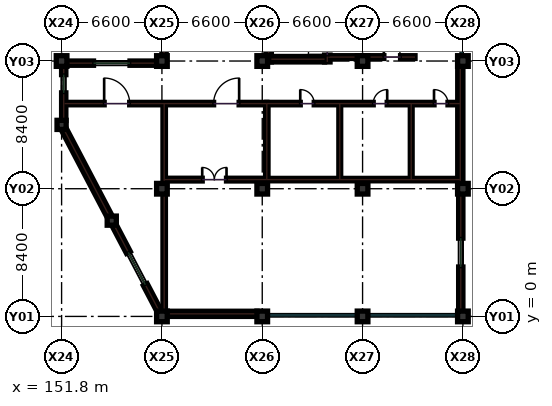
"""IFC4 building model, lengths in metres.
Left out: names, types, materials, properties, quantities, classifications, styles, units other than length and angle.
Written with IfcOpenShell. Run it as: python <this file> out.ifc"""

import sys

from ifc_helpers import new_model, si_unit, direction, frame, frame_2d, origin, origin_2d, place, context, subcontext, project, spatial, rectangle, extrude, element, fill, save


model = new_model("IFC4")
c1 = context("Model", 3, precision=1e-05, world=origin(), true_north=direction((0.0, 1.0)))
c2 = subcontext(c1, "Body", "Model", "MODEL_VIEW")
j1 = project(units=[si_unit("LENGTHUNIT", "METRE"), si_unit("PLANEANGLEUNIT", "RADIAN")], contexts=[c1])
p1 = place(None, origin())
s1 = spatial("IfcSite", under=j1, at=p1, CompositionType="ELEMENT")
p2 = place(p1, origin())
s2 = spatial("IfcBuilding", under=s1, at=p2, CompositionType="ELEMENT")
p3 = place(p2, frame((0.0, 0.0, 14.4)))
s3 = spatial("IfcBuildingStorey", under=s2, at=p3, CompositionType="ELEMENT", Elevation=14.4)
for number, where, z_axis, x_axis in (
    (1, (151.8, 16.8, 0.0), (0.0, 0.0, 1.0), (1.0, 0.0, 0.0)),
    (2, (158.4, 0.0, 0.0), (0.0, 0.0, 1.0), (1.0, 0.0, 0.0)),
    (3, (158.4, 8.4, 0.0), (0.0, 0.0, 1.0), (1.0, 0.0, 0.0)),
    (4, (158.4, 16.8, 0.0), (0.0, 0.0, 1.0), (1.0, 0.0, 0.0)),
    (5, (165.0, 0.0, 0.0), (0.0, 0.0, 1.0), (1.0, 0.0, 0.0)),
    (6, (165.0, 8.4, 0.0), (0.0, 0.0, 1.0), (1.0, 0.0, 0.0)),
    (7, (165.0, 16.8, 0.0), (0.0, 0.0, 1.0), (1.0, 0.0, 0.0)),
    (8, (171.6, 0.0, 0.0), (0.0, 0.0, 1.0), (1.0, 0.0, 0.0)),
    (9, (171.6, 8.4, 0.0), (0.0, 0.0, 1.0), (1.0, 0.0, 0.0)),
    (10, (171.6, 16.8, 0.0), (0.0, 0.0, 1.0), (1.0, 0.0, 0.0)),
    (11, (178.2, 0.0, 0.0), (0.0, 0.0, 1.0), (1.0, 0.0, 0.0)),
    (12, (178.2, 8.4, 0.0), (0.0, 0.0, 1.0), (1.0, 0.0, 0.0)),
    (13, (178.2, 16.8, 0.0), (0.0, 0.0, 1.0), (1.0, 0.0, 0.0)),
):
    element("IfcColumn", number, at=place(p3, frame(where, z_axis=z_axis, x_axis=x_axis)), inside=s3, PredefinedType="COLUMN", context=c2, shape_type="SweptSolid", body=[
        extrude(rectangle(XDim=0.7, YDim=0.7, at=origin_2d()), origin(), (0.0, 0.0, 1.0), 4.2),
    ])
for number, where, z_axis, x_axis in (
    (14, (151.8, 12.6, 0.0), (0.0, 0.0, 1.0), (1.0, 0.0, 0.0)),
    (15, (155.1, 6.3, 0.0), (0.0, 0.0, 1.0), (1.0, 0.0, 0.0)),
):
    element("IfcColumn", number, at=place(p3, frame(where, z_axis=z_axis, x_axis=x_axis)), inside=s3, PredefinedType="COLUMN", context=c2, shape_type="SweptSolid", body=[
        extrude(rectangle(XDim=0.6, YDim=0.6, at=origin_2d()), origin(), (0.0, 0.0, 1.0), 4.2),
    ])
p4 = place(p3, frame((165.3, 14.0, 0.0), z_axis=(0.0, 0.0, 1.0), x_axis=(1.0, 0.0, 0.0)))
e16 = element("IfcWall", 16, at=p4, inside=s3, PredefinedType="PARTITIONING", context=c2, shape_type="SweptSolid", body=[
    extrude(rectangle(XDim=12.7, YDim=0.16, at=frame_2d((6.35, 0.0))), origin(), (0.0, 0.0, 1.0), 3.19),
])
p5 = place(p4, frame((2.2, 0.0, 0.0)))
e17 = element("IfcOpeningElement", 17, at=p5, cuts=e16, PredefinedType="OPENING", context=c2, shape_type="SweptSolid", body=[
    extrude(rectangle(XDim=0.92, YDim=2.08, at=frame_2d((0.46, 1.04))), frame((0.0, 0.09, 0.0), z_axis=(0.0, -1.0, 0.0), x_axis=(1.0, 0.0, 0.0)), (0.0, 0.0, 1.0), 0.18),
])
p6 = place(p4, frame((7.0, 0.0, 0.0)))
e18 = element("IfcOpeningElement", 18, at=p6, cuts=e16, PredefinedType="OPENING", context=c2, shape_type="SweptSolid", body=[
    extrude(rectangle(XDim=0.92, YDim=2.08, at=frame_2d((0.46, 1.04))), frame((0.0, 0.09, 0.0), z_axis=(0.0, -1.0, 0.0), x_axis=(1.0, 0.0, 0.0)), (0.0, 0.0, 1.0), 0.18),
])
p7 = place(p4, frame((11.0, 0.0, 0.0)))
e19 = element("IfcOpeningElement", 19, at=p7, cuts=e16, PredefinedType="OPENING", context=c2, shape_type="SweptSolid", body=[
    extrude(rectangle(XDim=0.92, YDim=2.08, at=frame_2d((0.46, 1.04))), frame((0.0, 0.09, 0.0), z_axis=(0.0, -1.0, 0.0), x_axis=(1.0, 0.0, 0.0)), (0.0, 0.0, 1.0), 0.18),
])
p8 = place(p3, frame((165.3, 9.0, 0.0), z_axis=(0.0, 0.0, 1.0), x_axis=(1.0, 0.0, 0.0)))
e20 = element("IfcWall", 20, at=p8, inside=s3, PredefinedType="PARTITIONING", context=c2, shape_type="SweptSolid", body=[
    extrude(rectangle(XDim=12.7, YDim=0.16, at=frame_2d((6.35, 0.0))), origin(), (0.0, 0.0, 1.0), 3.19),
])
p9 = place(p3, frame((165.3, 9.0, 0.0), z_axis=(0.0, 0.0, 1.0), x_axis=(0.0, 1.0, 0.0)))
e21 = element("IfcWall", 21, at=p9, inside=s3, PredefinedType="PARTITIONING", context=c2, shape_type="SweptSolid", body=[
    extrude(rectangle(XDim=5.0, YDim=0.16, at=frame_2d((2.5, 0.0))), origin(), (0.0, 0.0, 1.0), 3.19),
])
for number, where, z_axis, x_axis in (
    (22, (170.1, 9.0, 0.0), (0.0, 0.0, 1.0), (0.0, 1.0, 0.0)),
    (23, (174.8, 9.0, 0.0), (0.0, 0.0, 1.0), (0.0, 1.0, 0.0)),
):
    element("IfcWall", number, at=place(p3, frame(where, z_axis=z_axis, x_axis=x_axis)), inside=s3, PredefinedType="PARTITIONING", context=c2, shape_type="SweptSolid", body=[
        extrude(rectangle(XDim=5.0, YDim=0.12, at=frame_2d((2.5, 0.0))), origin(), (0.0, 0.0, 1.0), 3.19),
    ])
p10 = place(p3, frame((158.55, 9.0, 0.0), z_axis=(0.0, 0.0, 1.0), x_axis=(1.0, 0.0, 0.0)))
e24 = element("IfcWall", 24, at=p10, inside=s3, PredefinedType="SOLIDWALL", context=c2, shape_type="SweptSolid", body=[
    extrude(rectangle(XDim=6.75, YDim=0.18, at=frame_2d((3.375, 0.0))), origin(), (0.0, 0.0, 1.0), 3.19),
])
p11 = place(p10, frame((2.5, 0.0, 0.0)))
e25 = element("IfcOpeningElement", 25, at=p11, cuts=e24, PredefinedType="OPENING", context=c2, shape_type="SweptSolid", body=[
    extrude(rectangle(XDim=1.6, YDim=2.2, at=frame_2d((0.8, 1.1))), frame((0.0, 0.1, 0.0), z_axis=(0.0, -1.0, 0.0), x_axis=(1.0, 0.0, 0.0)), (0.0, 0.0, 1.0), 0.2),
])
p12 = place(p3, frame((158.55, 0.25, 0.0), z_axis=(0.0, 0.0, 1.0), x_axis=(0.0, 1.0, 0.0)))
e26 = element("IfcWall", 26, at=p12, inside=s3, PredefinedType="PARTITIONING", context=c2, shape_type="SweptSolid", body=[
    extrude(rectangle(XDim=7.7, YDim=0.16, at=frame_2d((3.85, 0.0))), origin(), (0.0, 0.0, 1.0), 3.19),
])
p13 = place(p3, frame((158.55, 8.85, 0.0), z_axis=(0.0, 0.0, 1.0), x_axis=(0.0, 1.0, 0.0)))
e27 = element("IfcWall", 27, at=p13, inside=s3, PredefinedType="PARTITIONING", context=c2, shape_type="SweptSolid", body=[
    extrude(rectangle(XDim=5.15, YDim=0.16, at=frame_2d((2.575, 0.0))), origin(), (0.0, 0.0, 1.0), 3.19),
])
p14 = place(p3, frame((152.0, 14.0, 0.0), z_axis=(0.0, 0.0, 1.0), x_axis=(1.0, 0.0, 0.0)))
e28 = element("IfcWall", 28, at=p14, inside=s3, PredefinedType="PARTITIONING", context=c2, shape_type="SweptSolid", body=[
    extrude(rectangle(XDim=13.3, YDim=0.16, at=frame_2d((6.65, 0.0))), origin(), (0.0, 0.0, 1.0), 3.19),
])
p15 = place(p14, frame((2.6, 0.0, 0.0)))
e29 = element("IfcOpeningElement", 29, at=p15, cuts=e28, PredefinedType="OPENING", context=c2, shape_type="SweptSolid", body=[
    extrude(rectangle(XDim=1.68, YDim=2.28, at=frame_2d((0.84, 1.14))), frame((0.0, 0.09, 0.0), z_axis=(0.0, -1.0, 0.0), x_axis=(1.0, 0.0, 0.0)), (0.0, 0.0, 1.0), 0.18),
])
p16 = place(p14, frame((9.8, 0.0, 0.0)))
e30 = element("IfcOpeningElement", 30, at=p16, cuts=e28, PredefinedType="OPENING", context=c2, shape_type="SweptSolid", body=[
    extrude(rectangle(XDim=1.68, YDim=2.28, at=frame_2d((0.84, 1.14))), frame((0.0, 0.09, 0.0), z_axis=(0.0, -1.0, 0.0), x_axis=(1.0, 0.0, 0.0)), (0.0, 0.0, 1.0), 0.18),
])
p17 = place(p3, frame((158.055, 16.66, 0.0), z_axis=(0.0, 0.0, 1.0), x_axis=(-1.0, 0.0, 0.0)))
e31 = element("IfcWall", 31, at=p17, inside=s3, PredefinedType="SOLIDWALL", context=c2, shape_type="SweptSolid", body=[
    extrude(rectangle(XDim=5.91, YDim=0.28, at=frame_2d((2.955, 0.0))), origin(), (0.0, 0.0, 1.0), 3.325),
])
p18 = place(p17, frame((1.755, 0.0, 0.95)))
e32 = element("IfcOpeningElement", 32, at=p18, cuts=e31, PredefinedType="OPENING", context=c2, shape_type="SweptSolid", body=[
    extrude(rectangle(XDim=2.4, YDim=1.6, at=frame_2d((1.2, 0.8))), frame((0.0, 0.15, 0.0), z_axis=(0.0, -1.0, 0.0), x_axis=(1.0, 0.0, 0.0)), (0.0, 0.0, 1.0), 0.3),
])
p19 = place(p3, frame((158.745, 0.17, 0.0), z_axis=(0.0, 0.0, 1.0), x_axis=(1.0, 0.0, 0.0)))
e33 = element("IfcWall", 33, at=p19, inside=s3, PredefinedType="SHEAR", context=c2, shape_type="SweptSolid", body=[
    extrude(rectangle(XDim=5.91, YDim=0.34, at=frame_2d((2.955, 0.0))), origin(), (0.0, 0.0, 1.0), 3.94),
])
p20 = place(p3, frame((158.54, 24.855, 0.0), z_axis=(0.0, 0.0, 1.0), x_axis=(0.0, -1.0, 0.0)))
e34 = element("IfcWall", 34, at=p20, inside=s3, PredefinedType="SOLIDWALL", context=c2, shape_type="SweptSolid", body=[
    extrude(rectangle(XDim=7.71, YDim=0.28, at=frame_2d((3.855, 0.0))), origin(), (0.0, 0.0, 1.0), 3.225),
])
p21 = place(p20, frame((2.555, 0.0, 0.95)))
e35 = element("IfcOpeningElement", 35, at=p21, cuts=e34, PredefinedType="OPENING", context=c2, shape_type="SweptSolid", body=[
    extrude(rectangle(XDim=2.6, YDim=1.9, at=frame_2d((1.3, 0.95))), frame((0.0, 0.15, 0.0), z_axis=(0.0, -1.0, 0.0), x_axis=(1.0, 0.0, 0.0)), (0.0, 0.0, 1.0), 0.3),
])
p22 = place(p3, frame((178.06, 0.345, 0.0), z_axis=(0.0, 0.0, 1.0), x_axis=(0.0, 1.0, 0.0)))
e36 = element("IfcWall", 36, at=p22, inside=s3, PredefinedType="SOLIDWALL", context=c2, shape_type="SweptSolid", body=[
    extrude(rectangle(XDim=7.71, YDim=0.28, at=frame_2d((3.855, 0.0))), origin(), (0.0, 0.0, 1.0), 3.225),
])
p23 = place(p22, frame((2.905, 0.0, 0.95)))
e37 = element("IfcOpeningElement", 37, at=p23, cuts=e36, PredefinedType="OPENING", context=c2, shape_type="SweptSolid", body=[
    extrude(rectangle(XDim=1.9, YDim=1.85, at=frame_2d((0.95, 0.925))), frame((0.0, 0.15, 0.0), z_axis=(0.0, -1.0, 0.0), x_axis=(1.0, 0.0, 0.0)), (0.0, 0.0, 1.0), 0.3),
])
p24 = place(p3, frame((178.03, 8.745, 0.0), z_axis=(0.0, 0.0, 1.0), x_axis=(0.0, 1.0, 0.0)))
e38 = element("IfcWall", 38, at=p24, inside=s3, PredefinedType="SHEAR", context=c2, shape_type="SweptSolid", body=[
    extrude(rectangle(XDim=7.71, YDim=0.34, at=frame_2d((3.855, 0.0))), origin(), (0.0, 0.0, 1.0), 3.94),
])
p25 = place(p3, frame((151.94, 16.455, 0.0), z_axis=(0.0, 0.0, 1.0), x_axis=(0.0, -1.0, 0.0)))
e39 = element("IfcWall", 39, at=p25, inside=s3, PredefinedType="SOLIDWALL", context=c2, shape_type="SweptSolid", body=[
    extrude(rectangle(XDim=3.56, YDim=0.28, at=frame_2d((1.78, 0.0))), origin(), (0.0, 0.0, 1.0), 3.325),
])
p26 = place(p25, frame((0.55, 0.0, 0.95)))
e40 = element("IfcOpeningElement", 40, at=p26, cuts=e39, PredefinedType="OPENING", context=c2, shape_type="SweptSolid", body=[
    extrude(rectangle(XDim=1.2, YDim=1.5, at=frame_2d((0.6, 0.75))), frame((0.0, 0.15, 0.0), z_axis=(0.0, -1.0, 0.0), x_axis=(1.0, 0.0, 0.0)), (0.0, 0.0, 1.0), 0.3),
])
p27 = place(p3, frame((151.95, 12.31, 0.0), z_axis=(0.0, 0.0, 1.0), x_axis=(0.464471613901, -0.885588007981, 0.0)))
e41 = element("IfcWall", 41, at=p27, inside=s3, PredefinedType="SHEAR", context=c2, shape_type="SweptSolid", body=[
    extrude(rectangle(XDim=6.459, YDim=0.34, at=frame_2d((3.229, 0.0))), origin(), (0.0, 0.0, 1.0), 3.94),
])
p28 = place(p3, frame((155.25, 6.01, 0.0), z_axis=(0.0, 0.0, 1.0), x_axis=(0.464471613901, -0.885588007981, 0.0)))
e42 = element("IfcWall", 42, at=p28, inside=s3, PredefinedType="SOLIDWALL", context=c2, shape_type="SweptSolid", body=[
    extrude(rectangle(XDim=6.459, YDim=0.28, at=frame_2d((3.229, 0.0))), origin(), (0.0, 0.0, 1.0), 3.325),
])
p29 = place(p28, frame((2.03, 0.0, 0.95)))
e43 = element("IfcOpeningElement", 43, at=p29, cuts=e42, PredefinedType="OPENING", context=c2, shape_type="SweptSolid", body=[
    extrude(rectangle(XDim=2.4, YDim=1.6, at=frame_2d((1.2, 0.8))), frame((0.0, 0.15, 0.0), z_axis=(0.0, -1.0, 0.0), x_axis=(1.0, 0.0, 0.0)), (0.0, 0.0, 1.0), 0.3),
])
p30 = place(p3, frame((165.42, 16.74, 0.0), z_axis=(0.0, 0.0, 1.0), x_axis=(0.0, 1.0, 0.0)))
e44 = element("IfcWall", 44, at=p30, inside=s3, PredefinedType="SHEAR", context=c2, shape_type="SweptSolid", body=[
    extrude(rectangle(XDim=8.37, YDim=0.36, at=frame_2d((4.185, 0.0))), origin(), (0.0, 0.0, 1.0), 3.94),
])
p31 = place(p3, frame((169.28, 16.74, 0.0), z_axis=(0.0, 0.0, 1.0), x_axis=(0.0, 1.0, 0.0)))
e45 = element("IfcWall", 45, at=p31, inside=s3, PredefinedType="SHEAR", context=c2, shape_type="SweptSolid", body=[
    extrude(rectangle(XDim=8.37, YDim=0.36, at=frame_2d((4.185, 0.0))), origin(), (0.0, 0.0, 1.0), 3.94),
])
p32 = place(p31, frame((0.45, 0.0, 0.0)))
e46 = element("IfcOpeningElement", 46, at=p32, cuts=e45, PredefinedType="OPENING", context=c2, shape_type="SweptSolid", body=[
    extrude(rectangle(XDim=1.25, YDim=2.15, at=frame_2d((0.625, 1.075))), frame((0.0, 0.19, 0.0), z_axis=(0.0, -1.0, 0.0), x_axis=(1.0, 0.0, 0.0)), (0.0, 0.0, 1.0), 0.38),
])
p33 = place(p3, frame((165.6, 16.92, 0.0), z_axis=(0.0, 0.0, 1.0), x_axis=(1.0, 0.0, 0.0)))
e47 = element("IfcWall", 47, at=p33, inside=s3, PredefinedType="SHEAR", context=c2, shape_type="SweptSolid", body=[
    extrude(rectangle(XDim=3.5, YDim=0.36, at=frame_2d((1.75, 0.0))), origin(), (0.0, 0.0, 1.0), 3.94),
])
p34 = place(p3, frame((169.35, 17.06, 0.0), z_axis=(0.0, 0.0, 1.0), x_axis=(1.0, 0.0, 0.0)))
e48 = element("IfcWall", 48, at=p34, inside=s3, PredefinedType="SOLIDWALL", context=c2, shape_type="SweptSolid", body=[
    extrude(rectangle(XDim=5.7, YDim=0.18, at=frame_2d((2.85, 0.0))), origin(), (0.0, 0.0, 1.0), 3.275),
])
p35 = place(p34, frame((3.65, 0.0, 0.0)))
e49 = element("IfcOpeningElement", 49, at=p35, cuts=e48, PredefinedType="OPENING", context=c2, shape_type="SweptSolid", body=[
    extrude(rectangle(XDim=1.1, YDim=2.15, at=frame_2d((0.55, 1.075))), frame((0.0, 0.1, 0.0), z_axis=(0.0, -1.0, 0.0), x_axis=(1.0, 0.0, 0.0)), (0.0, 0.0, 1.0), 0.2),
])
p36 = place(p5, origin())
e50 = element("IfcDoor", 50, at=p36, inside=s3, OperationType="SINGLE_SWING_LEFT", PredefinedType="DOOR", context=c2, shape_type="SweptSolid", body=[
    extrude(rectangle(XDim=0.92, YDim=2.08, at=frame_2d((0.46, 1.04))), frame((0.0, 0.025, 0.0), z_axis=(0.0, -1.0, 0.0), x_axis=(1.0, 0.0, 0.0)), (0.0, 0.0, 1.0), 0.05),
])
fill(e17, e50)
p37 = place(p6, origin())
e51 = element("IfcDoor", 51, at=p37, inside=s3, OperationType="SINGLE_SWING_RIGHT", PredefinedType="DOOR", context=c2, shape_type="SweptSolid", body=[
    extrude(rectangle(XDim=0.92, YDim=2.08, at=frame_2d((0.46, 1.04))), frame((0.0, 0.025, 0.0), z_axis=(0.0, -1.0, 0.0), x_axis=(1.0, 0.0, 0.0)), (0.0, 0.0, 1.0), 0.05),
])
fill(e18, e51)
p38 = place(p7, origin())
e52 = element("IfcDoor", 52, at=p38, inside=s3, OperationType="SINGLE_SWING_LEFT", PredefinedType="DOOR", context=c2, shape_type="SweptSolid", body=[
    extrude(rectangle(XDim=0.92, YDim=2.08, at=frame_2d((0.46, 1.04))), frame((0.0, 0.025, 0.0), z_axis=(0.0, -1.0, 0.0), x_axis=(1.0, 0.0, 0.0)), (0.0, 0.0, 1.0), 0.05),
])
fill(e19, e52)
p39 = place(p11, origin())
e53 = element("IfcDoor", 53, at=p39, inside=s3, OperationType="DOUBLE_DOOR_SINGLE_SWING", PredefinedType="DOOR", context=c2, shape_type="SweptSolid", body=[
    extrude(rectangle(XDim=1.6, YDim=2.2, at=frame_2d((0.8, 1.1))), frame((0.0, 0.025, 0.0), z_axis=(0.0, -1.0, 0.0), x_axis=(1.0, 0.0, 0.0)), (0.0, 0.0, 1.0), 0.05),
])
fill(e25, e53)
p40 = place(p15, origin())
e54 = element("IfcDoor", 54, at=p40, inside=s3, OperationType="SINGLE_SWING_LEFT", PredefinedType="DOOR", context=c2, shape_type="SweptSolid", body=[
    extrude(rectangle(XDim=1.68, YDim=2.28, at=frame_2d((0.84, 1.14))), frame((0.0, 0.025, 0.0), z_axis=(0.0, -1.0, 0.0), x_axis=(1.0, 0.0, 0.0)), (0.0, 0.0, 1.0), 0.05),
])
fill(e29, e54)
p41 = place(p16, origin())
e55 = element("IfcDoor", 55, at=p41, inside=s3, OperationType="SINGLE_SWING_RIGHT", PredefinedType="DOOR", context=c2, shape_type="SweptSolid", body=[
    extrude(rectangle(XDim=1.68, YDim=2.28, at=frame_2d((0.84, 1.14))), frame((0.0, 0.025, 0.0), z_axis=(0.0, -1.0, 0.0), x_axis=(1.0, 0.0, 0.0)), (0.0, 0.0, 1.0), 0.05),
])
fill(e30, e55)
p42 = place(p18, origin())
e56 = element("IfcWindow", 56, at=p42, inside=s3, PartitioningType="SINGLE_PANEL", PredefinedType="WINDOW", context=c2, shape_type="SweptSolid", body=[
    extrude(rectangle(XDim=2.4, YDim=1.6, at=frame_2d((1.2, 0.8))), frame((0.0, 0.03, 0.0), z_axis=(0.0, -1.0, 0.0), x_axis=(1.0, 0.0, 0.0)), (0.0, 0.0, 1.0), 0.06),
])
fill(e32, e56)
p43 = place(p23, origin())
e57 = element("IfcWindow", 57, at=p43, inside=s3, PartitioningType="SINGLE_PANEL", PredefinedType="WINDOW", context=c2, shape_type="SweptSolid", body=[
    extrude(rectangle(XDim=1.9, YDim=1.85, at=frame_2d((0.95, 0.925))), frame((0.0, 0.03, 0.0), z_axis=(0.0, -1.0, 0.0), x_axis=(1.0, 0.0, 0.0)), (0.0, 0.0, 1.0), 0.06),
])
fill(e37, e57)
p44 = place(p26, origin())
e58 = element("IfcWindow", 58, at=p44, inside=s3, PartitioningType="SINGLE_PANEL", PredefinedType="WINDOW", context=c2, shape_type="SweptSolid", body=[
    extrude(rectangle(XDim=1.2, YDim=1.5, at=frame_2d((0.6, 0.75))), frame((0.0, 0.03, 0.0), z_axis=(0.0, -1.0, 0.0), x_axis=(1.0, 0.0, 0.0)), (0.0, 0.0, 1.0), 0.06),
])
fill(e40, e58)
p45 = place(p29, origin())
e59 = element("IfcWindow", 59, at=p45, inside=s3, PartitioningType="SINGLE_PANEL", PredefinedType="WINDOW", context=c2, shape_type="SweptSolid", body=[
    extrude(rectangle(XDim=2.4, YDim=1.6, at=frame_2d((1.2, 0.8))), frame((0.0, 0.03, 0.0), z_axis=(0.0, -1.0, 0.0), x_axis=(1.0, 0.0, 0.0)), (0.0, 0.0, 1.0), 0.06),
])
fill(e43, e59)
p46 = place(p32, origin())
e60 = element("IfcDoor", 60, at=p46, inside=s3, OperationType="SINGLE_SWING_LEFT", PredefinedType="DOOR", context=c2, shape_type="SweptSolid", body=[
    extrude(rectangle(XDim=1.25, YDim=2.15, at=frame_2d((0.625, 1.075))), frame((0.0, 0.025, 0.0), z_axis=(0.0, -1.0, 0.0), x_axis=(1.0, 0.0, 0.0)), (0.0, 0.0, 1.0), 0.05),
])
fill(e46, e60)
p47 = place(p35, origin())
e61 = element("IfcDoor", 61, at=p47, inside=s3, OperationType="SINGLE_SWING_LEFT", PredefinedType="DOOR", context=c2, shape_type="SweptSolid", body=[
    extrude(rectangle(XDim=1.1, YDim=2.15, at=frame_2d((0.55, 1.075))), frame((0.0, 0.025, 0.0), z_axis=(0.0, -1.0, 0.0), x_axis=(1.0, 0.0, 0.0)), (0.0, 0.0, 1.0), 0.05),
])
fill(e49, e61)
save(model, sys.argv[1])
